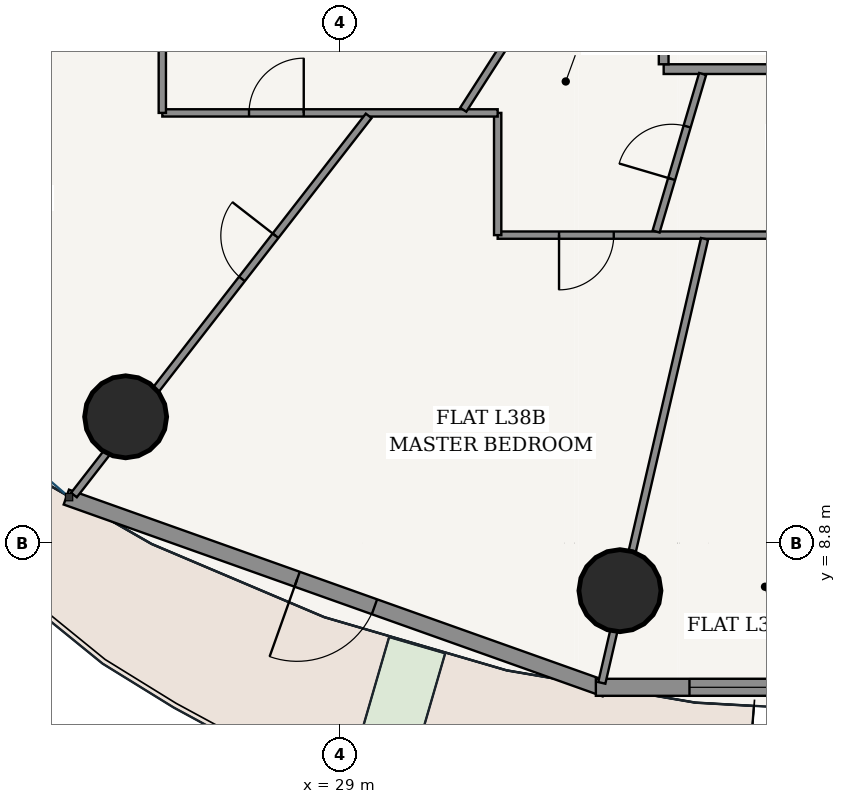
"""IFC4 building model, lengths in metres.
Left out: names, types, materials, properties, quantities, classifications, styles, units other than length and angle.
Written with IfcOpenShell. Run it as: python <this file> out.ifc"""

import sys

from ifc_helpers import new_model, si_unit, direction, frame, frame_2d, origin, origin_2d, place, context, subcontext, project, spatial, rectangle, hollow_circle, extrude, source, transform, mapped, element, fill, save


model = new_model("IFC4")
c1 = context("Model", 3, precision=1e-05, world=origin(), true_north=direction((-0.2419218956, 0.970295726276)))
c2 = subcontext(c1, "Body", "Model", "MODEL_VIEW")
j1 = project(units=[si_unit("LENGTHUNIT", "METRE"), si_unit("PLANEANGLEUNIT", "RADIAN")], contexts=[c1])
p1 = place(None, origin())
s1 = spatial("IfcSite", under=j1, at=p1, CompositionType="ELEMENT")
p2 = place(p1, origin())
s2 = spatial("IfcBuilding", under=s1, at=p2, CompositionType="ELEMENT")
p3 = place(p2, frame((0.0, 0.0, 146.2)))
s3 = spatial("IfcBuildingStorey", under=s2, at=p3, CompositionType="ELEMENT", Elevation=146.2)
for number, where, z_axis, x_axis in (
    (1, (25.472, 10.877, 0.0), (0.0, 0.0, 1.0), (1.0, 0.0, 0.0)),
    (2, (33.601, 8.018, 0.0), (0.0, 0.0, 1.0), (1.0, 0.0, 0.0)),
):
    element("IfcColumn", number, at=place(p3, frame(where, z_axis=z_axis, x_axis=x_axis)), inside=s3, PredefinedType="COLUMN", context=c2, shape_type="SweptSolid", body=[
        extrude(hollow_circle(Radius=0.675, WallThickness=0.042, at=origin_2d()), origin(), (0.0, 0.0, 1.0), 3.6),
    ])
p4 = place(p3, frame((24.497, 9.557, 0.0), z_axis=(0.0, 0.0, 1.0), x_axis=(0.942103604331, -0.335321932934, 0.0)))
e3 = element("IfcWall", 3, at=p4, inside=s3, PredefinedType="SOLIDWALL", context=c2, shape_type="SweptSolid", body=[
    extrude(rectangle(XDim=9.408, YDim=0.26, at=frame_2d((4.704, 0.0))), origin(), (0.0, 0.0, 1.0), 3.33),
])
p5 = place(p4, frame((4.029, 0.0, 0.0)))
e4 = element("IfcOpeningElement", 4, at=p5, cuts=e3, PredefinedType="OPENING", context=c2, shape_type="SweptSolid", body=[
    extrude(rectangle(XDim=1.35, YDim=2.2, at=frame_2d((0.675, 1.1))), frame((0.0, 0.14, 0.0), z_axis=(0.0, -1.0, 0.0), x_axis=(1.0, 0.0, 0.0)), (0.0, 0.0, 1.0), 0.28),
])
p6 = place(p3, frame((33.205, 6.429, 0.0), z_axis=(0.0, 0.0, 1.0), x_axis=(1.0, 0.0, 0.0)))
e5 = element("IfcWall", 5, at=p6, inside=s3, PredefinedType="SOLIDWALL", context=c2, shape_type="SweptSolid", body=[
    extrude(rectangle(XDim=9.591, YDim=0.28, at=frame_2d((4.795, 0.0))), origin(), (0.0, 0.0, 1.0), 3.33),
])
p7 = place(p6, frame((1.54, 0.0, 0.85)))
e6 = element("IfcOpeningElement", 6, at=p7, cuts=e5, PredefinedType="OPENING", context=c2, shape_type="SweptSolid", body=[
    extrude(rectangle(XDim=2.1, YDim=1.95, at=frame_2d((1.05, 0.975))), frame((0.0, 0.15, 0.0), z_axis=(0.0, -1.0, 0.0), x_axis=(1.0, 0.0, 0.0)), (0.0, 0.0, 1.0), 0.3),
])
p8 = place(p6, frame((5.951, 0.0, 0.85)))
e7 = element("IfcOpeningElement", 7, at=p8, cuts=e5, PredefinedType="OPENING", context=c2, shape_type="SweptSolid", body=[
    extrude(rectangle(XDim=2.1, YDim=1.95, at=frame_2d((1.05, 0.975))), frame((0.0, 0.15, 0.0), z_axis=(0.0, -1.0, 0.0), x_axis=(1.0, 0.0, 0.0)), (0.0, 0.0, 1.0), 0.3),
])
p9 = place(p3, frame((34.32, 16.595, 0.0), z_axis=(0.0, 0.0, 1.0), x_axis=(1.0, 0.0, 0.0)))
e8 = element("IfcWall", 8, at=p9, inside=s3, PredefinedType="PARTITIONING", context=c2, shape_type="SweptSolid", body=[
    extrude(rectangle(XDim=14.885, YDim=0.16, at=frame_2d((7.442, 0.0))), origin(), (0.0, 0.0, 1.0), 2.776),
])
p10 = place(p9, frame((11.609, 0.0, 0.0)))
e9 = element("IfcOpeningElement", 9, at=p10, cuts=e8, PredefinedType="OPENING", context=c2, shape_type="SweptSolid", body=[
    extrude(rectangle(XDim=0.98, YDim=2.2, at=frame_2d((0.49, 1.1))), frame((0.0, 0.09, 0.0), z_axis=(0.0, -1.0, 0.0), x_axis=(1.0, 0.0, 0.0)), (0.0, 0.0, 1.0), 0.18),
])
p11 = place(p3, frame((34.32, 16.675, 0.0), z_axis=(0.0, 0.0, 1.0), x_axis=(0.0, 1.0, 0.0)))
e10 = element("IfcWall", 10, at=p11, inside=s3, PredefinedType="PARTITIONING", context=c2, shape_type="SweptSolid", body=[
    extrude(rectangle(XDim=1.85, YDim=0.16, at=frame_2d((0.925, 0.0))), origin(), (0.0, 0.0, 1.0), 3.33),
])
p12 = place(p3, frame((51.935, 13.865, 0.0), z_axis=(0.0, 0.0, 1.0), x_axis=(-1.0, 0.0, 0.0)))
e11 = element("IfcWall", 11, at=p12, inside=s3, PredefinedType="PARTITIONING", context=c2, shape_type="SweptSolid", body=[
    extrude(rectangle(XDim=20.345, YDim=0.12, at=frame_2d((10.172, 0.0))), origin(), (0.0, 0.0, 1.0), 2.776),
])
p13 = place(p12, frame((2.985, 0.0, 0.0)))
e12 = element("IfcOpeningElement", 12, at=p13, cuts=e11, PredefinedType="OPENING", context=c2, shape_type="SweptSolid", body=[
    extrude(rectangle(XDim=0.9, YDim=2.15, at=frame_2d((0.45, 1.075))), frame((0.0, 0.07, 0.0), z_axis=(0.0, -1.0, 0.0), x_axis=(1.0, 0.0, 0.0)), (0.0, 0.0, 1.0), 0.14),
])
p14 = place(p12, frame((12.333, 0.0, 0.0)))
e13 = element("IfcOpeningElement", 13, at=p14, cuts=e11, PredefinedType="OPENING", context=c2, shape_type="SweptSolid", body=[
    extrude(rectangle(XDim=0.9, YDim=2.15, at=frame_2d((0.45, 1.075))), frame((0.0, 0.07, 0.0), z_axis=(0.0, -1.0, 0.0), x_axis=(1.0, 0.0, 0.0)), (0.0, 0.0, 1.0), 0.14),
])
p15 = place(p12, frame((18.436, 0.0, 0.0)))
e14 = element("IfcOpeningElement", 14, at=p15, cuts=e11, PredefinedType="OPENING", context=c2, shape_type="SweptSolid", body=[
    extrude(rectangle(XDim=0.9, YDim=2.15, at=frame_2d((0.45, 1.075))), frame((0.0, 0.07, 0.0), z_axis=(0.0, -1.0, 0.0), x_axis=(1.0, 0.0, 0.0)), (0.0, 0.0, 1.0), 0.14),
])
p16 = place(p3, frame((31.59, 13.865, 0.0), z_axis=(0.0, 0.0, 1.0), x_axis=(0.0, 1.0, 0.0)))
e15 = element("IfcWall", 15, at=p16, inside=s3, PredefinedType="PARTITIONING", context=c2, shape_type="SweptSolid", body=[
    extrude(rectangle(XDim=2.01, YDim=0.12, at=frame_2d((1.005, 0.0))), origin(), (0.0, 0.0, 1.0), 3.005),
])
p17 = place(p3, frame((31.59, 15.875, 0.0), z_axis=(0.0, 0.0, 1.0), x_axis=(-1.0, 0.0, 0.0)))
e16 = element("IfcWall", 16, at=p17, inside=s3, PredefinedType="PARTITIONING", context=c2, shape_type="SweptSolid", body=[
    extrude(rectangle(XDim=5.515, YDim=0.12, at=frame_2d((2.758, 0.0))), origin(), (0.0, 0.0, 1.0), 2.776),
])
p18 = place(p17, frame((3.189, 0.0, 0.0)))
e17 = element("IfcOpeningElement", 17, at=p18, cuts=e16, PredefinedType="OPENING", context=c2, shape_type="SweptSolid", body=[
    extrude(rectangle(XDim=0.9, YDim=2.15, at=frame_2d((0.45, 1.075))), frame((0.0, 0.07, 0.0), z_axis=(0.0, -1.0, 0.0), x_axis=(1.0, 0.0, 0.0)), (0.0, 0.0, 1.0), 0.14),
])
p19 = place(p3, frame((26.075, 15.875, 0.0), z_axis=(0.0, 0.0, 1.0), x_axis=(0.0, 1.0, 0.0)))
e18 = element("IfcWall", 18, at=p19, inside=s3, PredefinedType="PARTITIONING", context=c2, shape_type="SweptSolid", body=[
    extrude(rectangle(XDim=5.715, YDim=0.12, at=frame_2d((2.857, 0.0))), origin(), (0.0, 0.0, 1.0), 2.776),
])
p20 = place(p19, frame((3.648, 0.0, 0.0)))
e19 = element("IfcOpeningElement", 19, at=p20, cuts=e18, PredefinedType="OPENING", context=c2, shape_type="SweptSolid", body=[
    extrude(rectangle(XDim=0.86, YDim=2.15, at=frame_2d((0.43, 1.075))), frame((0.0, 0.07, 0.0), z_axis=(0.0, -1.0, 0.0), x_axis=(1.0, 0.0, 0.0)), (0.0, 0.0, 1.0), 0.14),
])
p21 = place(p3, frame((29.469, 15.826, 0.0), z_axis=(0.0, 0.0, 1.0), x_axis=(-0.61373942367, -0.789508657225, 0.0)))
e20 = element("IfcWall", 20, at=p21, inside=s3, PredefinedType="PARTITIONING", context=c2, shape_type="SweptSolid", body=[
    extrude(rectangle(XDim=7.898, YDim=0.12, at=frame_2d((3.949, 0.0))), origin(), (0.0, 0.0, 1.0), 2.776),
])
p22 = place(p21, frame((2.496, 0.0, 0.0)))
e21 = element("IfcOpeningElement", 21, at=p22, cuts=e20, PredefinedType="OPENING", context=c2, shape_type="SweptSolid", body=[
    extrude(rectangle(XDim=0.9, YDim=2.15, at=frame_2d((0.45, 1.075))), frame((0.0, 0.07, 0.0), z_axis=(0.0, -1.0, 0.0), x_axis=(1.0, 0.0, 0.0)), (0.0, 0.0, 1.0), 0.14),
])
p23 = place(p3, frame((34.992, 13.805, 0.0), z_axis=(0.0, 0.0, 1.0), x_axis=(-0.225447000045, -0.974255433739, 0.0)))
e22 = element("IfcWall", 22, at=p23, inside=s3, PredefinedType="PARTITIONING", context=c2, shape_type="SweptSolid", body=[
    extrude(rectangle(XDim=7.496, YDim=0.12, at=frame_2d((3.748, 0.0))), origin(), (0.0, 0.0, 1.0), 2.776),
])
p24 = place(p3, frame((32.691, 18.525, 0.0), z_axis=(0.0, 0.0, 1.0), x_axis=(-0.54002976428, -0.841645919429, 0.0)))
e23 = element("IfcWall", 23, at=p24, inside=s3, PredefinedType="PARTITIONING", context=c2, shape_type="SweptSolid", body=[
    extrude(rectangle(XDim=3.086, YDim=0.12, at=frame_2d((1.543, 0.0))), origin(), (0.0, 0.0, 1.0), 3.33),
])
p25 = place(p3, frame((34.961, 16.515, 0.0), z_axis=(0.0, 0.0, 1.0), x_axis=(-0.283365034326, -0.959012125743, 0.0)))
e24 = element("IfcWall", 24, at=p25, inside=s3, PredefinedType="PARTITIONING", context=c2, shape_type="SweptSolid", body=[
    extrude(rectangle(XDim=2.701, YDim=0.12, at=frame_2d((1.351, 0.0))), origin(), (0.0, 0.0, 1.0), 3.33),
])
p26 = place(p25, frame((0.901, 0.0, 0.0)))
e25 = element("IfcOpeningElement", 25, at=p26, cuts=e24, PredefinedType="OPENING", context=c2, shape_type="SweptSolid", body=[
    extrude(rectangle(XDim=0.9, YDim=2.15, at=frame_2d((0.45, 1.075))), frame((0.0, 0.07, 0.0), z_axis=(0.0, -1.0, 0.0), x_axis=(1.0, 0.0, 0.0)), (0.0, 0.0, 1.0), 0.14),
])
m1 = source(origin(), c2, "Body", "SweptSolid", [
    extrude(rectangle(XDim=1.35, YDim=2.2, at=frame_2d((0.675, 1.1))), frame((0.0, 0.025, 0.0), z_axis=(0.0, -1.0, 0.0), x_axis=(1.0, 0.0, 0.0)), (0.0, 0.0, 1.0), 0.05),
])
p27 = place(p5, frame((1.35, 0.0, 0.0), z_axis=(0.0, 0.0, 1.0), x_axis=(-1.0, 0.0, 0.0)))
e26 = element("IfcDoor", 26, at=p27, inside=s3, OperationType="SINGLE_SWING_RIGHT", PredefinedType="DOOR", context=c2, shape_type="MappedRepresentation", body=[
    mapped(m1, transform((0.0, 0.0, 0.0), scale=1.0)),
])
fill(e4, e26)
m2 = source(origin(), c2, "Body", "SweptSolid", [
    extrude(rectangle(XDim=2.1, YDim=1.95, at=frame_2d((1.05, 0.975))), frame((0.0, 0.03, 0.0), z_axis=(0.0, -1.0, 0.0), x_axis=(1.0, 0.0, 0.0)), (0.0, 0.0, 1.0), 0.06),
])
p28 = place(p7, origin())
e27 = element("IfcWindow", 27, at=p28, inside=s3, PartitioningType="SINGLE_PANEL", PredefinedType="WINDOW", context=c2, shape_type="MappedRepresentation", body=[
    mapped(m2, transform((0.0, 0.0, 0.0), scale=1.0)),
])
fill(e6, e27)
m3 = source(origin(), c2, "Body", "SweptSolid", [
    extrude(rectangle(XDim=0.9, YDim=2.15, at=frame_2d((0.45, 1.075))), frame((0.0, 0.025, 0.0), z_axis=(0.0, -1.0, 0.0), x_axis=(1.0, 0.0, 0.0)), (0.0, 0.0, 1.0), 0.05),
])
p29 = place(p26, frame((0.9, 0.0, 0.0), z_axis=(0.0, 0.0, 1.0), x_axis=(-1.0, 0.0, 0.0)))
e28 = element("IfcDoor", 28, at=p29, inside=s3, OperationType="SINGLE_SWING_LEFT", PredefinedType="DOOR", context=c2, shape_type="MappedRepresentation", body=[
    mapped(m3, transform((0.0, 0.0, 0.0), scale=1.0)),
])
fill(e25, e28)
p30 = place(p15, origin())
e29 = element("IfcDoor", 29, at=p30, inside=s3, OperationType="SINGLE_SWING_RIGHT", PredefinedType="DOOR", context=c2, shape_type="MappedRepresentation", body=[
    mapped(m3, transform((0.0, 0.0, 0.0), scale=1.0)),
])
fill(e14, e29)
p31 = place(p22, frame((0.9, 0.0, 0.0), z_axis=(0.0, 0.0, 1.0), x_axis=(-1.0, 0.0, 0.0)))
e30 = element("IfcDoor", 30, at=p31, inside=s3, OperationType="SINGLE_SWING_RIGHT", PredefinedType="DOOR", context=c2, shape_type="MappedRepresentation", body=[
    mapped(m3, transform((0.0, 0.0, 0.0), scale=1.0)),
])
fill(e21, e30)
p32 = place(p18, frame((0.9, 0.0, 0.0), z_axis=(0.0, 0.0, 1.0), x_axis=(-1.0, 0.0, 0.0)))
e31 = element("IfcDoor", 31, at=p32, inside=s3, OperationType="SINGLE_SWING_RIGHT", PredefinedType="DOOR", context=c2, shape_type="MappedRepresentation", body=[
    mapped(m3, transform((0.0, 0.0, 0.0), scale=1.0)),
])
fill(e17, e31)
save(model, sys.argv[1])
